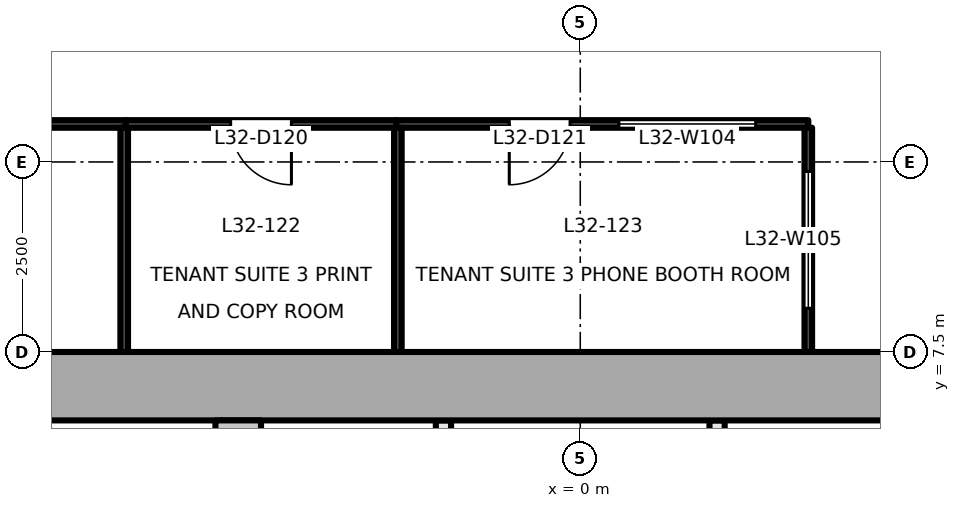
"""IFC4 building model, lengths in metres.
Left out: names, types, materials, properties, quantities, classifications, styles, units other than length and angle.
Written with IfcOpenShell. Run it as: python <this file> out.ifc"""

import sys

from ifc_helpers import new_model, si_unit, direction, frame, frame_2d, origin, place, context, subcontext, project, spatial, rectangle, extrude, element, fill, save


model = new_model("IFC4")
c1 = context("Model", 3, precision=1e-05, world=origin(), true_north=direction((0.0, 1.0)))
c2 = subcontext(c1, "Body", "Model", "MODEL_VIEW")
j1 = project(units=[si_unit("LENGTHUNIT", "METRE"), si_unit("PLANEANGLEUNIT", "RADIAN")], contexts=[c1])
p1 = place(None, origin())
s1 = spatial("IfcSite", under=j1, at=p1, CompositionType="ELEMENT")
p2 = place(p1, origin())
s2 = spatial("IfcBuilding", under=s1, at=p2, CompositionType="ELEMENT")
p3 = place(p2, frame((0.0, 0.0, 142.1)))
s3 = spatial("IfcBuildingStorey", under=s2, at=p3, CompositionType="ELEMENT", Elevation=142.1)
p4 = place(p3, frame((-18.0, 7.05, -0.2), z_axis=(0.0, 0.0, 1.0), x_axis=(1.0, 0.0, 0.0)))
e1 = element("IfcWall", 1, at=p4, inside=s3, PredefinedType="SHEAR", context=c2, shape_type="SweptSolid", body=[
    extrude(rectangle(XDim=36.0, YDim=0.9, at=frame_2d((18.0, 0.0))), origin(), (0.0, 0.0, 1.0), 4.0),
])
p5 = place(p3, frame((-4.5, -6.6, -0.2), z_axis=(0.0, 0.0, 1.0), x_axis=(0.0, 1.0, 0.0)))
e2 = element("IfcWall", 2, at=p5, inside=s3, PredefinedType="SHEAR", context=c2, shape_type="SweptSolid", body=[
    extrude(rectangle(XDim=13.2, YDim=0.6, at=frame_2d((6.6, 0.0))), origin(), (0.0, 0.0, 1.0), 4.0),
])
p6 = place(p3, frame((-1.8, -6.6, 0.0), z_axis=(0.0, 0.0, 1.0), x_axis=(0.0, 1.0, 0.0)))
e3 = element("IfcWall", 3, at=p6, inside=s3, PredefinedType="PARTITIONING", context=c2, shape_type="SweptSolid", body=[
    extrude(rectangle(XDim=13.2, YDim=0.2, at=frame_2d((6.6, 0.0))), origin(), (0.0, 0.0, 1.0), 3.8),
])
p7 = place(p6, frame((0.55, 0.0, 0.0)))
e4 = element("IfcOpeningElement", 4, at=p7, cuts=e3, PredefinedType="OPENING", context=c2, shape_type="SweptSolid", body=[
    extrude(rectangle(XDim=0.9, YDim=2.1, at=frame_2d((0.45, 1.05))), frame((0.0, 0.111, 0.0), z_axis=(0.0, -1.0, 0.0), x_axis=(1.0, 0.0, 0.0)), (0.0, 0.0, 1.0), 0.221),
])
p8 = place(p3, frame((1.8, -6.6, 0.0), z_axis=(0.0, 0.0, 1.0), x_axis=(0.0, 1.0, 0.0)))
e5 = element("IfcWall", 5, at=p8, inside=s3, PredefinedType="PARTITIONING", context=c2, shape_type="SweptSolid", body=[
    extrude(rectangle(XDim=13.2, YDim=0.2, at=frame_2d((6.6, 0.0))), origin(), (0.0, 0.0, 1.0), 3.8),
])
p9 = place(p8, frame((0.55, 0.0, 0.0)))
e6 = element("IfcOpeningElement", 6, at=p9, cuts=e5, PredefinedType="OPENING", context=c2, shape_type="SweptSolid", body=[
    extrude(rectangle(XDim=0.9, YDim=2.1, at=frame_2d((0.45, 1.05))), frame((0.0, 0.111, 0.0), z_axis=(0.0, -1.0, 0.0), x_axis=(1.0, 0.0, 0.0)), (0.0, 0.0, 1.0), 0.221),
])
p10 = place(p3, frame((-5.98, 10.5, 0.0), z_axis=(0.0, 0.0, 1.0), x_axis=(-1.0, 0.0, 0.0)))
e7 = element("IfcWall", 7, at=p10, inside=s3, PredefinedType="PARTITIONING", context=c2, shape_type="SweptSolid", body=[
    extrude(rectangle(XDim=7.84, YDim=0.1, at=frame_2d((3.92, 0.0))), origin(), (0.0, 0.0, 1.0), 3.5),
])
p11 = place(p10, frame((2.182, 0.0, 0.0)))
e8 = element("IfcOpeningElement", 8, at=p11, cuts=e7, PredefinedType="OPENING", context=c2, shape_type="SweptSolid", body=[
    extrude(rectangle(XDim=0.9, YDim=2.1, at=frame_2d((0.45, 1.05))), frame((0.0, 0.061, 0.0), z_axis=(0.0, -1.0, 0.0), x_axis=(1.0, 0.0, 0.0)), (0.0, 0.0, 1.0), 0.121),
])
p12 = place(p3, frame((-2.42, 10.5, 0.0), z_axis=(0.0, 0.0, 1.0), x_axis=(-1.0, 0.0, 0.0)))
e9 = element("IfcWall", 9, at=p12, inside=s3, PredefinedType="PARTITIONING", context=c2, shape_type="SweptSolid", body=[
    extrude(rectangle(XDim=3.56, YDim=0.1, at=frame_2d((1.78, 0.0))), origin(), (0.0, 0.0, 1.0), 3.5),
])
p13 = place(p12, frame((1.38, 0.0, 0.0)))
e10 = element("IfcOpeningElement", 10, at=p13, cuts=e9, PredefinedType="OPENING", context=c2, shape_type="SweptSolid", body=[
    extrude(rectangle(XDim=0.8, YDim=2.1, at=frame_2d((0.4, 1.05))), frame((0.0, 0.061, 0.0), z_axis=(0.0, -1.0, 0.0), x_axis=(1.0, 0.0, 0.0)), (0.0, 0.0, 1.0), 0.121),
])
p14 = place(p3, frame((3.0, 10.5, 0.0), z_axis=(0.0, 0.0, 1.0), x_axis=(-1.0, 0.0, 0.0)))
e11 = element("IfcWall", 11, at=p14, inside=s3, PredefinedType="PARTITIONING", context=c2, shape_type="SweptSolid", body=[
    extrude(rectangle(XDim=5.42, YDim=0.1, at=frame_2d((2.71, 0.0))), origin(), (0.0, 0.0, 1.0), 3.5),
])
p15 = place(p14, frame((3.134, 0.0, 0.0)))
e12 = element("IfcOpeningElement", 12, at=p15, cuts=e11, PredefinedType="OPENING", context=c2, shape_type="SweptSolid", body=[
    extrude(rectangle(XDim=0.8, YDim=2.1, at=frame_2d((0.4, 1.05))), frame((0.0, 0.061, 0.0), z_axis=(0.0, -1.0, 0.0), x_axis=(1.0, 0.0, 0.0)), (0.0, 0.0, 1.0), 0.121),
])
p16 = place(p14, frame((0.692, 0.0, 0.9)))
e13 = element("IfcOpeningElement", 13, at=p16, cuts=e11, PredefinedType="OPENING", context=c2, shape_type="SweptSolid", body=[
    extrude(rectangle(XDim=1.8, YDim=1.2, at=frame_2d((0.9, 0.6))), frame((0.0, 0.061, 0.0), z_axis=(0.0, -1.0, 0.0), x_axis=(1.0, 0.0, 0.0)), (0.0, 0.0, 1.0), 0.121),
])
p17 = place(p3, frame((3.0, 7.5, 0.0), z_axis=(0.0, 0.0, 1.0), x_axis=(0.0, 1.0, 0.0)))
e14 = element("IfcWall", 14, at=p17, inside=s3, PredefinedType="PARTITIONING", context=c2, shape_type="SweptSolid", body=[
    extrude(rectangle(XDim=2.95, YDim=0.1, at=frame_2d((1.475, 0.0))), origin(), (0.0, 0.0, 1.0), 3.8),
])
p18 = place(p17, frame((0.575, 0.0, 0.9)))
e15 = element("IfcOpeningElement", 15, at=p18, cuts=e14, PredefinedType="OPENING", context=c2, shape_type="SweptSolid", body=[
    extrude(rectangle(XDim=1.8, YDim=1.2, at=frame_2d((0.9, 0.6))), frame((0.0, 0.061, 0.0), z_axis=(0.0, -1.0, 0.0), x_axis=(1.0, 0.0, 0.0)), (0.0, 0.0, 1.0), 0.121),
])
for number, where, z_axis, x_axis in (
    (16, (-6.0, 10.45, 0.0), (0.0, 0.0, 1.0), (0.0, -1.0, 0.0)),
    (17, (-2.4, 10.45, 0.0), (0.0, 0.0, 1.0), (0.0, -1.0, 0.0)),
):
    element("IfcWall", number, at=place(p3, frame(where, z_axis=z_axis, x_axis=x_axis)), inside=s3, PredefinedType="PARTITIONING", context=c2, shape_type="SweptSolid", body=[
        extrude(rectangle(XDim=2.95, YDim=0.1, at=frame_2d((1.475, 0.0))), origin(), (0.0, 0.0, 1.0), 3.8),
    ])
p19 = place(p13, origin())
e18 = element("IfcDoor", 18, at=p19, inside=s3, OperationType="SINGLE_SWING_LEFT", PredefinedType="DOOR", context=c2, shape_type="SweptSolid", body=[
    extrude(rectangle(XDim=0.8, YDim=2.1, at=frame_2d((0.4, 1.05))), frame((0.0, 0.025, 0.0), z_axis=(0.0, -1.0, 0.0), x_axis=(1.0, 0.0, 0.0)), (0.0, 0.0, 1.0), 0.05),
])
fill(e10, e18)
p20 = place(p15, origin())
e19 = element("IfcDoor", 19, at=p20, inside=s3, OperationType="SINGLE_SWING_RIGHT", PredefinedType="DOOR", context=c2, shape_type="SweptSolid", body=[
    extrude(rectangle(XDim=0.8, YDim=2.1, at=frame_2d((0.4, 1.05))), frame((0.0, 0.025, 0.0), z_axis=(0.0, -1.0, 0.0), x_axis=(1.0, 0.0, 0.0)), (0.0, 0.0, 1.0), 0.05),
])
fill(e12, e19)
p21 = place(p16, origin())
e20 = element("IfcWindow", 20, at=p21, inside=s3, PartitioningType="SINGLE_PANEL", PredefinedType="WINDOW", context=c2, shape_type="SweptSolid", body=[
    extrude(rectangle(XDim=1.8, YDim=1.2, at=frame_2d((0.9, 0.6))), frame((0.0, 0.03, 0.0), z_axis=(0.0, -1.0, 0.0), x_axis=(1.0, 0.0, 0.0)), (0.0, 0.0, 1.0), 0.06),
])
fill(e13, e20)
p22 = place(p18, origin())
e21 = element("IfcWindow", 21, at=p22, inside=s3, PartitioningType="SINGLE_PANEL", PredefinedType="WINDOW", context=c2, shape_type="SweptSolid", body=[
    extrude(rectangle(XDim=1.8, YDim=1.2, at=frame_2d((0.9, 0.6))), frame((0.0, 0.03, 0.0), z_axis=(0.0, -1.0, 0.0), x_axis=(1.0, 0.0, 0.0)), (0.0, 0.0, 1.0), 0.06),
])
fill(e15, e21)
save(model, sys.argv[1])
